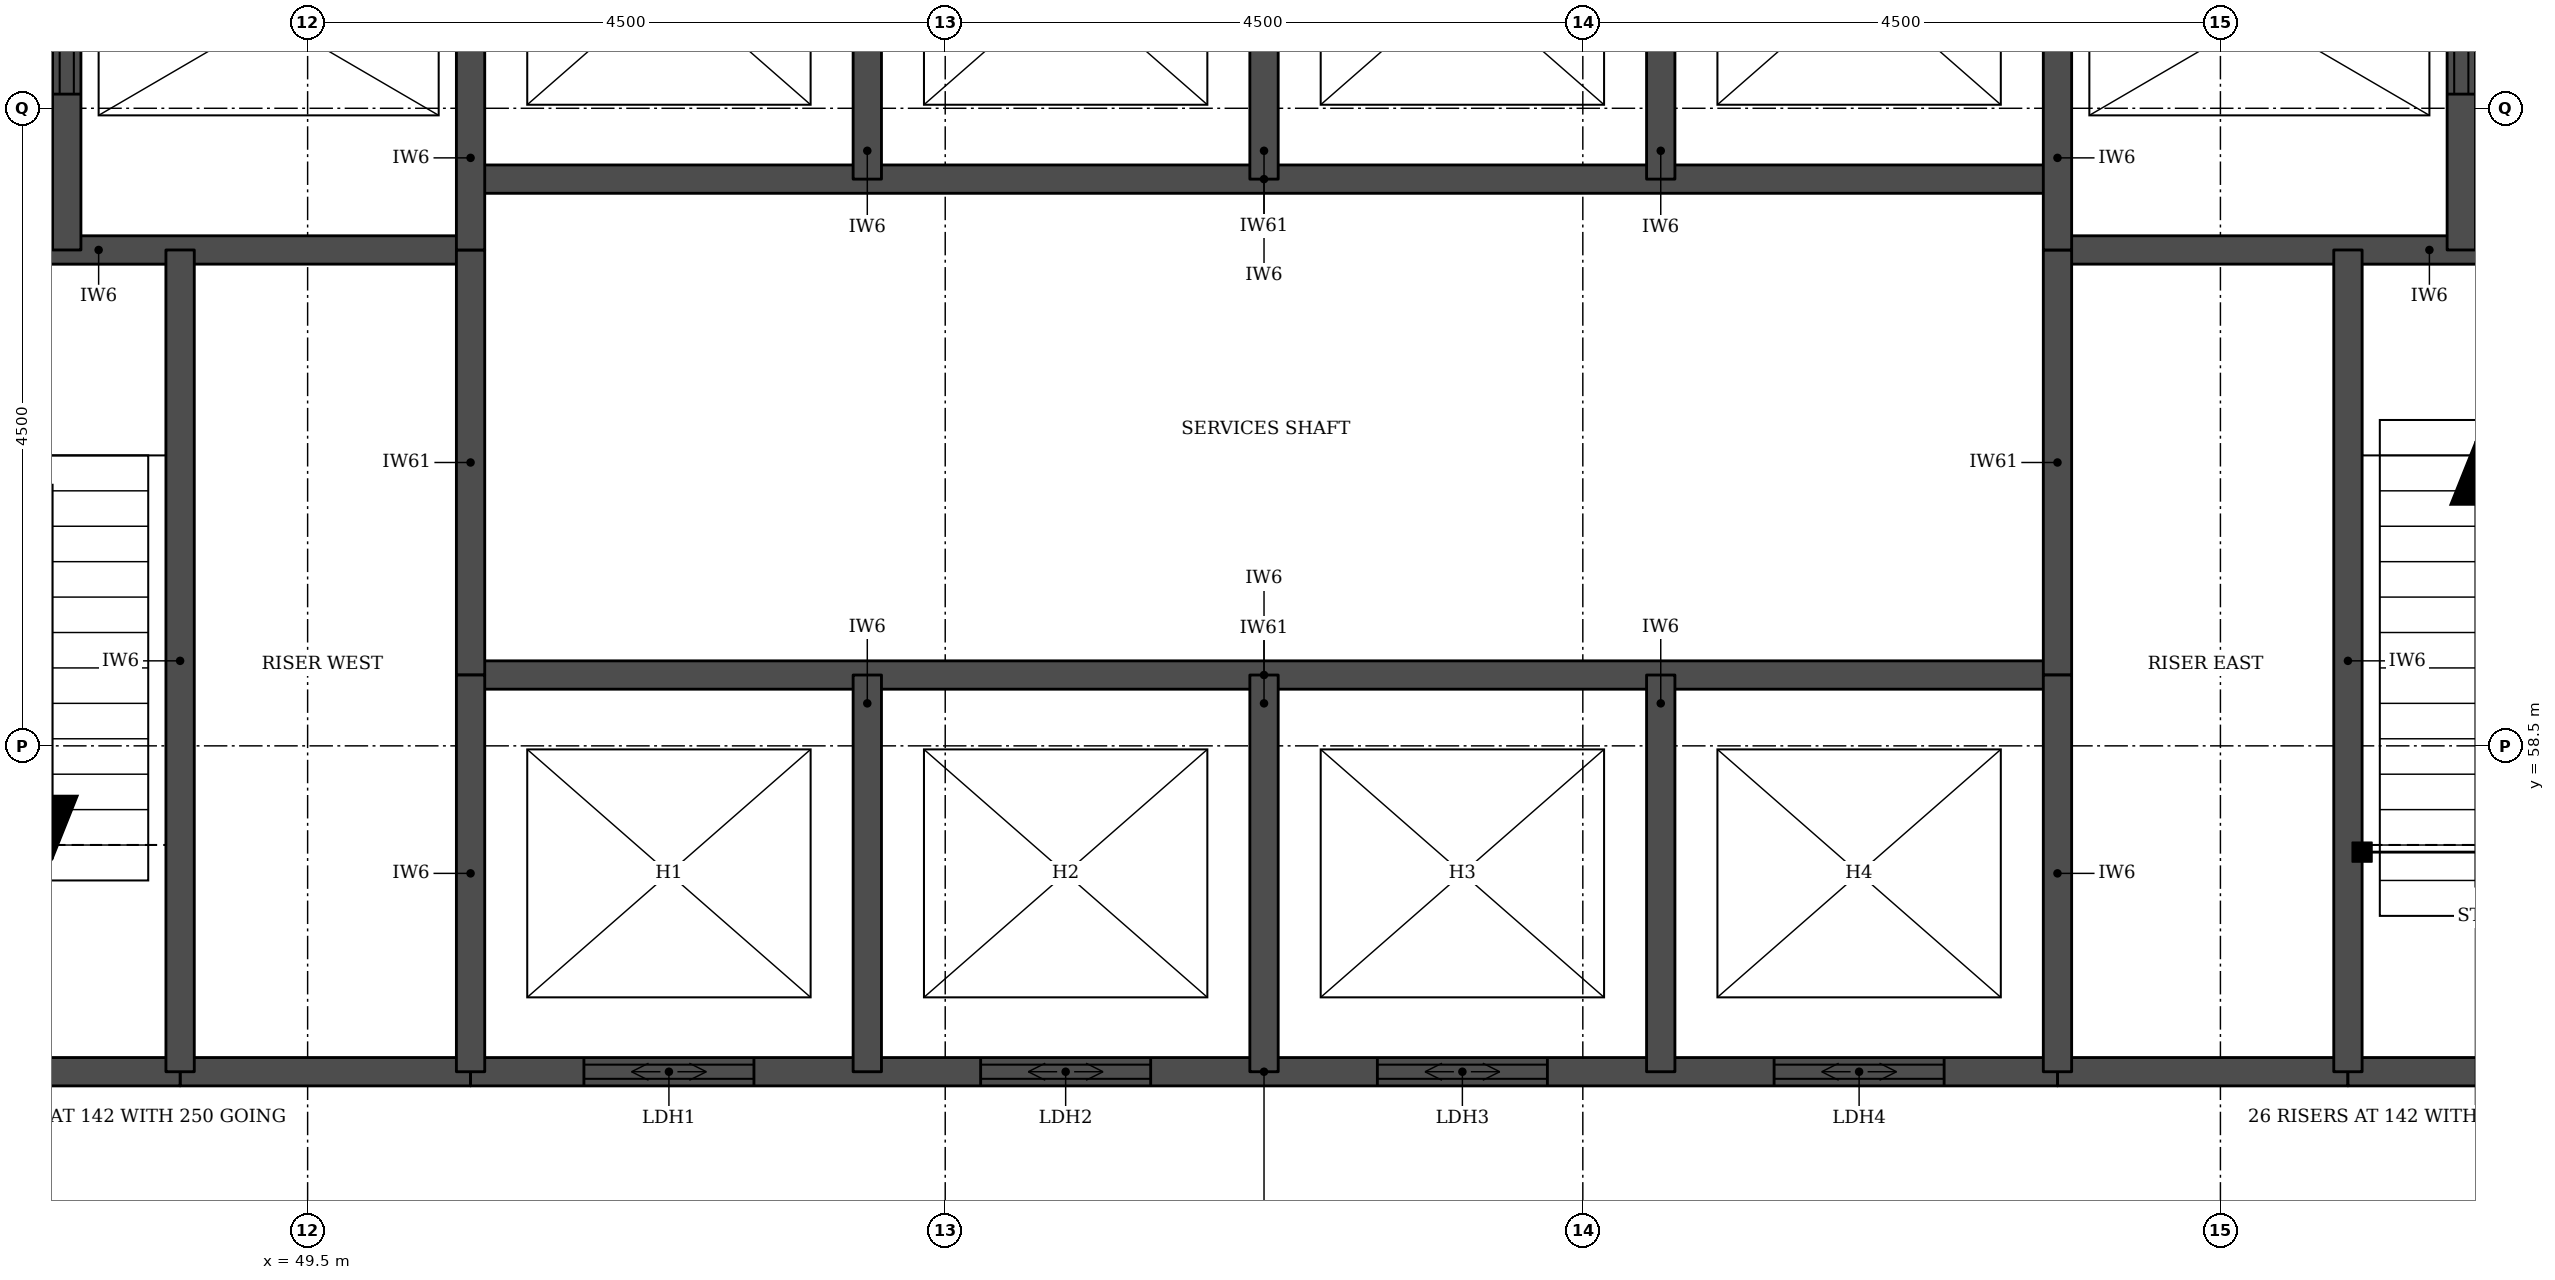
"""IFC4 building model, lengths in metres.
Left out: names, types, materials, properties, quantities, classifications, styles, units other than length and angle.
Written with IfcOpenShell. Run it as: python <this file> out.ifc"""

import sys

from ifc_helpers import new_model, si_unit, direction, frame, frame_2d, origin, place, context, subcontext, project, spatial, rectangle, extrude, element, fill, save


model = new_model("IFC4")
c1 = context("Model", 3, precision=1e-05, world=origin(), true_north=direction((0.0, 1.0)))
c2 = subcontext(c1, "Body", "Model", "MODEL_VIEW")
j1 = project(units=[si_unit("LENGTHUNIT", "METRE"), si_unit("PLANEANGLEUNIT", "RADIAN")], contexts=[c1])
p1 = place(None, origin())
s1 = spatial("IfcSite", under=j1, at=p1, CompositionType="ELEMENT")
p2 = place(p1, origin())
s2 = spatial("IfcBuilding", under=s1, at=p2, CompositionType="ELEMENT")
p3 = place(p2, frame((0.0, 0.0, 219.3)))
s3 = spatial("IfcBuildingStorey", under=s2, at=p3, CompositionType="ELEMENT", Elevation=219.3)
for number, where, z_axis, x_axis in (
    (1, (48.6, 56.2, 0.0), (0.0, 0.0, 1.0), (1.0, 0.0, 0.0)),
    (2, (61.85, 56.2, 0.0), (0.0, 0.0, 1.0), (1.0, 0.0, 0.0)),
):
    element("IfcWall", number, at=place(p3, frame(where, z_axis=z_axis, x_axis=x_axis)), inside=s3, PredefinedType="SOLIDWALL", context=c2, shape_type="SweptSolid", body=[
        extrude(rectangle(XDim=2.05, YDim=0.2, at=frame_2d((1.025, 0.0))), origin(), (0.0, 0.0, 1.0), 3.55),
    ])
p4 = place(p3, frame((45.4, 56.2, 0.0), z_axis=(0.0, 0.0, 1.0), x_axis=(1.0, 0.0, 0.0)))
e3 = element("IfcWall", 3, at=p4, inside=s3, PredefinedType="SOLIDWALL", context=c2, shape_type="SweptSolid", body=[
    extrude(rectangle(XDim=3.2, YDim=0.2, at=frame_2d((1.6, 0.0))), origin(), (0.0, 0.0, 1.0), 3.55),
])
p5 = place(p3, frame((50.65, 56.2, 0.0), z_axis=(0.0, 0.0, 1.0), x_axis=(1.0, 0.0, 0.0)))
e4 = element("IfcWall", 4, at=p5, inside=s3, PredefinedType="SOLIDWALL", context=c2, shape_type="SweptSolid", body=[
    extrude(rectangle(XDim=11.2, YDim=0.2, at=frame_2d((5.6, 0.0))), origin(), (0.0, 0.0, 1.0), 3.55),
])
p6 = place(p5, frame((0.8, 0.0, 0.0)))
e5 = element("IfcOpeningElement", 5, at=p6, cuts=e4, PredefinedType="OPENING", context=c2, shape_type="SweptSolid", body=[
    extrude(rectangle(XDim=1.2, YDim=2.1, at=frame_2d((0.6, 1.05))), frame((0.0, 0.11, 0.0), z_axis=(0.0, -1.0, 0.0), x_axis=(1.0, 0.0, 0.0)), (0.0, 0.0, 1.0), 0.22),
])
p7 = place(p5, frame((3.6, 0.0, 0.0)))
e6 = element("IfcOpeningElement", 6, at=p7, cuts=e4, PredefinedType="OPENING", context=c2, shape_type="SweptSolid", body=[
    extrude(rectangle(XDim=1.2, YDim=2.1, at=frame_2d((0.6, 1.05))), frame((0.0, 0.11, 0.0), z_axis=(0.0, -1.0, 0.0), x_axis=(1.0, 0.0, 0.0)), (0.0, 0.0, 1.0), 0.22),
])
p8 = place(p5, frame((6.4, 0.0, 0.0)))
e7 = element("IfcOpeningElement", 7, at=p8, cuts=e4, PredefinedType="OPENING", context=c2, shape_type="SweptSolid", body=[
    extrude(rectangle(XDim=1.2, YDim=2.1, at=frame_2d((0.6, 1.05))), frame((0.0, 0.11, 0.0), z_axis=(0.0, -1.0, 0.0), x_axis=(1.0, 0.0, 0.0)), (0.0, 0.0, 1.0), 0.22),
])
p9 = place(p5, frame((9.2, 0.0, 0.0)))
e8 = element("IfcOpeningElement", 8, at=p9, cuts=e4, PredefinedType="OPENING", context=c2, shape_type="SweptSolid", body=[
    extrude(rectangle(XDim=1.2, YDim=2.1, at=frame_2d((0.6, 1.05))), frame((0.0, 0.11, 0.0), z_axis=(0.0, -1.0, 0.0), x_axis=(1.0, 0.0, 0.0)), (0.0, 0.0, 1.0), 0.22),
])
p10 = place(p3, frame((63.9, 56.2, 0.0), z_axis=(0.0, 0.0, 1.0), x_axis=(1.0, 0.0, 0.0)))
e9 = element("IfcWall", 9, at=p10, inside=s3, PredefinedType="SOLIDWALL", context=c2, shape_type="SweptSolid", body=[
    extrude(rectangle(XDim=3.2, YDim=0.2, at=frame_2d((1.6, 0.0))), origin(), (0.0, 0.0, 1.0), 3.55),
])
p11 = place(p3, frame((50.65, 59.0, 0.0), z_axis=(0.0, 0.0, 1.0), x_axis=(1.0, 0.0, 0.0)))
e10 = element("IfcWall", 10, at=p11, inside=s3, PredefinedType="SOLIDWALL", context=c2, shape_type="SweptSolid", body=[
    extrude(rectangle(XDim=11.2, YDim=0.2, at=frame_2d((5.6, 0.0))), origin(), (0.0, 0.0, 1.0), 3.7),
])
for number, where, z_axis, x_axis in (
    (11, (45.4, 62.0, 0.0), (0.0, 0.0, 1.0), (1.0, 0.0, 0.0)),
    (12, (61.85, 62.0, 0.0), (0.0, 0.0, 1.0), (1.0, 0.0, 0.0)),
):
    element("IfcWall", number, at=place(p3, frame(where, z_axis=z_axis, x_axis=x_axis)), inside=s3, PredefinedType="SOLIDWALL", context=c2, shape_type="SweptSolid", body=[
        extrude(rectangle(XDim=5.25, YDim=0.2, at=frame_2d((2.625, 0.0))), origin(), (0.0, 0.0, 1.0), 3.55),
    ])
p12 = place(p3, frame((50.65, 62.5, 0.0), z_axis=(0.0, 0.0, 1.0), x_axis=(1.0, 0.0, 0.0)))
e13 = element("IfcWall", 13, at=p12, inside=s3, PredefinedType="SOLIDWALL", context=c2, shape_type="SweptSolid", body=[
    extrude(rectangle(XDim=11.2, YDim=0.2, at=frame_2d((5.6, 0.0))), origin(), (0.0, 0.0, 1.0), 3.7),
])
p13 = place(p3, frame((47.8, 62.0, 0.0), z_axis=(0.0, 0.0, 1.0), x_axis=(0.0, 1.0, 0.0)))
e14 = element("IfcWall", 14, at=p13, inside=s3, PredefinedType="SOLIDWALL", context=c2, shape_type="SweptSolid", body=[
    extrude(rectangle(XDim=3.3, YDim=0.2, at=frame_2d((1.65, 0.0))), origin(), (0.0, 0.0, 1.0), 3.55),
])
p14 = place(p13, frame((1.1, 0.0, 0.0)))
e15 = element("IfcOpeningElement", 15, at=p14, cuts=e14, PredefinedType="OPENING", context=c2, shape_type="SweptSolid", body=[
    extrude(rectangle(XDim=1.1, YDim=2.1, at=frame_2d((0.55, 1.05))), frame((0.0, 0.11, 0.0), z_axis=(0.0, -1.0, 0.0), x_axis=(1.0, 0.0, 0.0)), (0.0, 0.0, 1.0), 0.22),
])
p15 = place(p3, frame((48.6, 56.2, 0.0), z_axis=(0.0, 0.0, 1.0), x_axis=(0.0, 1.0, 0.0)))
e16 = element("IfcWall", 16, at=p15, inside=s3, PredefinedType="SOLIDWALL", context=c2, shape_type="SweptSolid", body=[
    extrude(rectangle(XDim=5.8, YDim=0.2, at=frame_2d((2.9, 0.0))), origin(), (0.0, 0.0, 1.0), 3.55),
])
p16 = place(p3, frame((50.65, 59.0, 0.0), z_axis=(0.0, 0.0, 1.0), x_axis=(0.0, 1.0, 0.0)))
e17 = element("IfcWall", 17, at=p16, inside=s3, PredefinedType="SOLIDWALL", context=c2, shape_type="SweptSolid", body=[
    extrude(rectangle(XDim=3.0, YDim=0.2, at=frame_2d((1.5, 0.0))), origin(), (0.0, 0.0, 1.0), 3.7),
])
p17 = place(p3, frame((50.65, 56.2, 0.0), z_axis=(0.0, 0.0, 1.0), x_axis=(0.0, 1.0, 0.0)))
e18 = element("IfcWall", 18, at=p17, inside=s3, PredefinedType="SOLIDWALL", context=c2, shape_type="SweptSolid", body=[
    extrude(rectangle(XDim=2.8, YDim=0.2, at=frame_2d((1.4, 0.0))), origin(), (0.0, 0.0, 1.0), 3.55),
])
p18 = place(p3, frame((50.65, 62.0, 0.0), z_axis=(0.0, 0.0, 1.0), x_axis=(0.0, 1.0, 0.0)))
e19 = element("IfcWall", 19, at=p18, inside=s3, PredefinedType="SOLIDWALL", context=c2, shape_type="SweptSolid", body=[
    extrude(rectangle(XDim=3.3, YDim=0.2, at=frame_2d((1.65, 0.0))), origin(), (0.0, 0.0, 1.0), 3.55),
])
for number, where, z_axis, x_axis in (
    (20, (53.45, 56.2, 0.0), (0.0, 0.0, 1.0), (0.0, 1.0, 0.0)),
    (21, (53.45, 62.5, 0.0), (0.0, 0.0, 1.0), (0.0, 1.0, 0.0)),
    (22, (56.25, 56.2, 0.0), (0.0, 0.0, 1.0), (0.0, 1.0, 0.0)),
    (23, (56.25, 62.5, 0.0), (0.0, 0.0, 1.0), (0.0, 1.0, 0.0)),
    (24, (59.05, 56.2, 0.0), (0.0, 0.0, 1.0), (0.0, 1.0, 0.0)),
    (25, (59.05, 62.5, 0.0), (0.0, 0.0, 1.0), (0.0, 1.0, 0.0)),
):
    element("IfcWall", number, at=place(p3, frame(where, z_axis=z_axis, x_axis=x_axis)), inside=s3, PredefinedType="SOLIDWALL", context=c2, shape_type="SweptSolid", body=[
        extrude(rectangle(XDim=2.8, YDim=0.2, at=frame_2d((1.4, 0.0))), origin(), (0.0, 0.0, 1.0), 3.55),
    ])
p19 = place(p3, frame((61.85, 59.0, 0.0), z_axis=(0.0, 0.0, 1.0), x_axis=(0.0, 1.0, 0.0)))
e26 = element("IfcWall", 26, at=p19, inside=s3, PredefinedType="SOLIDWALL", context=c2, shape_type="SweptSolid", body=[
    extrude(rectangle(XDim=3.0, YDim=0.2, at=frame_2d((1.5, 0.0))), origin(), (0.0, 0.0, 1.0), 3.7),
])
p20 = place(p3, frame((61.85, 56.2, 0.0), z_axis=(0.0, 0.0, 1.0), x_axis=(0.0, 1.0, 0.0)))
e27 = element("IfcWall", 27, at=p20, inside=s3, PredefinedType="SOLIDWALL", context=c2, shape_type="SweptSolid", body=[
    extrude(rectangle(XDim=2.8, YDim=0.2, at=frame_2d((1.4, 0.0))), origin(), (0.0, 0.0, 1.0), 3.55),
])
p21 = place(p3, frame((61.85, 62.0, 0.0), z_axis=(0.0, 0.0, 1.0), x_axis=(0.0, 1.0, 0.0)))
e28 = element("IfcWall", 28, at=p21, inside=s3, PredefinedType="SOLIDWALL", context=c2, shape_type="SweptSolid", body=[
    extrude(rectangle(XDim=3.3, YDim=0.2, at=frame_2d((1.65, 0.0))), origin(), (0.0, 0.0, 1.0), 3.55),
])
p22 = place(p3, frame((63.9, 56.2, 0.0), z_axis=(0.0, 0.0, 1.0), x_axis=(0.0, 1.0, 0.0)))
e29 = element("IfcWall", 29, at=p22, inside=s3, PredefinedType="SOLIDWALL", context=c2, shape_type="SweptSolid", body=[
    extrude(rectangle(XDim=5.8, YDim=0.2, at=frame_2d((2.9, 0.0))), origin(), (0.0, 0.0, 1.0), 3.55),
])
p23 = place(p3, frame((64.7, 62.0, 0.0), z_axis=(0.0, 0.0, 1.0), x_axis=(0.0, 1.0, 0.0)))
e30 = element("IfcWall", 30, at=p23, inside=s3, PredefinedType="SOLIDWALL", context=c2, shape_type="SweptSolid", body=[
    extrude(rectangle(XDim=3.3, YDim=0.2, at=frame_2d((1.65, 0.0))), origin(), (0.0, 0.0, 1.0), 3.55),
])
p24 = place(p23, frame((1.1, 0.0, 0.0)))
e31 = element("IfcOpeningElement", 31, at=p24, cuts=e30, PredefinedType="OPENING", context=c2, shape_type="SweptSolid", body=[
    extrude(rectangle(XDim=1.1, YDim=2.1, at=frame_2d((0.55, 1.05))), frame((0.0, 0.11, 0.0), z_axis=(0.0, -1.0, 0.0), x_axis=(1.0, 0.0, 0.0)), (0.0, 0.0, 1.0), 0.22),
])
p25 = place(p6, origin())
e32 = element("IfcDoor", 32, at=p25, inside=s3, OperationType="DOUBLE_DOOR_SLIDING", PredefinedType="DOOR", context=c2, shape_type="SweptSolid", body=[
    extrude(rectangle(XDim=1.2, YDim=2.1, at=frame_2d((0.6, 1.05))), frame((0.0, 0.025, 0.0), z_axis=(0.0, -1.0, 0.0), x_axis=(1.0, 0.0, 0.0)), (0.0, 0.0, 1.0), 0.05),
])
fill(e5, e32)
p26 = place(p7, origin())
e33 = element("IfcDoor", 33, at=p26, inside=s3, OperationType="DOUBLE_DOOR_SLIDING", PredefinedType="DOOR", context=c2, shape_type="SweptSolid", body=[
    extrude(rectangle(XDim=1.2, YDim=2.1, at=frame_2d((0.6, 1.05))), frame((0.0, 0.025, 0.0), z_axis=(0.0, -1.0, 0.0), x_axis=(1.0, 0.0, 0.0)), (0.0, 0.0, 1.0), 0.05),
])
fill(e6, e33)
p27 = place(p8, origin())
e34 = element("IfcDoor", 34, at=p27, inside=s3, OperationType="DOUBLE_DOOR_SLIDING", PredefinedType="DOOR", context=c2, shape_type="SweptSolid", body=[
    extrude(rectangle(XDim=1.2, YDim=2.1, at=frame_2d((0.6, 1.05))), frame((0.0, 0.025, 0.0), z_axis=(0.0, -1.0, 0.0), x_axis=(1.0, 0.0, 0.0)), (0.0, 0.0, 1.0), 0.05),
])
fill(e7, e34)
p28 = place(p9, origin())
e35 = element("IfcDoor", 35, at=p28, inside=s3, OperationType="DOUBLE_DOOR_SLIDING", PredefinedType="DOOR", context=c2, shape_type="SweptSolid", body=[
    extrude(rectangle(XDim=1.2, YDim=2.1, at=frame_2d((0.6, 1.05))), frame((0.0, 0.025, 0.0), z_axis=(0.0, -1.0, 0.0), x_axis=(1.0, 0.0, 0.0)), (0.0, 0.0, 1.0), 0.05),
])
fill(e8, e35)
p29 = place(p14, origin())
e36 = element("IfcDoor", 36, at=p29, inside=s3, OperationType="DOUBLE_DOOR_SLIDING", PredefinedType="DOOR", context=c2, shape_type="SweptSolid", body=[
    extrude(rectangle(XDim=1.1, YDim=2.1, at=frame_2d((0.55, 1.05))), frame((0.0, 0.025, 0.0), z_axis=(0.0, -1.0, 0.0), x_axis=(1.0, 0.0, 0.0)), (0.0, 0.0, 1.0), 0.05),
])
fill(e15, e36)
p30 = place(p24, origin())
e37 = element("IfcDoor", 37, at=p30, inside=s3, OperationType="DOUBLE_DOOR_SLIDING", PredefinedType="DOOR", context=c2, shape_type="SweptSolid", body=[
    extrude(rectangle(XDim=1.1, YDim=2.1, at=frame_2d((0.55, 1.05))), frame((0.0, 0.025, 0.0), z_axis=(0.0, -1.0, 0.0), x_axis=(1.0, 0.0, 0.0)), (0.0, 0.0, 1.0), 0.05),
])
fill(e31, e37)
save(model, sys.argv[1])
